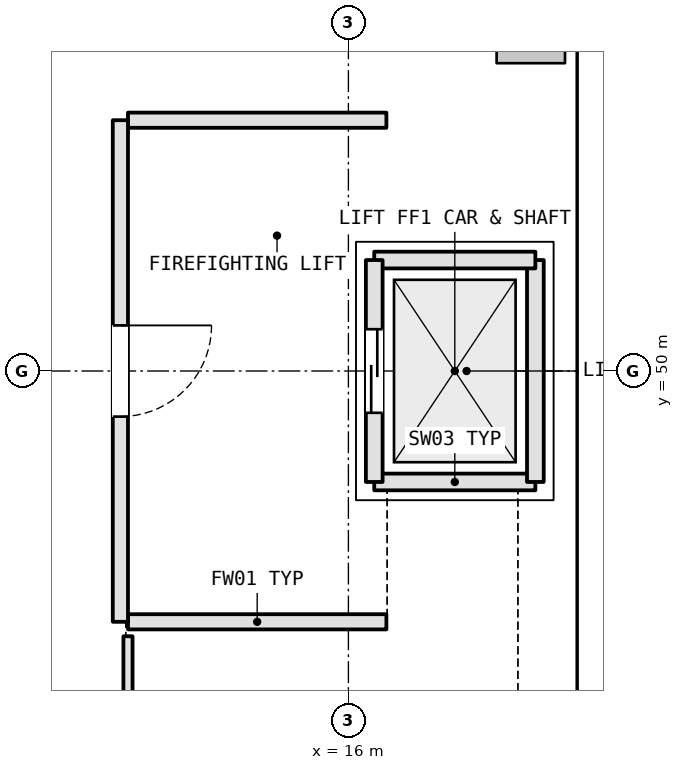
"""IFC4 building model, lengths in metres.
Left out: names, types, materials, properties, quantities, classifications, styles, units other than length and angle.
Written with IfcOpenShell. Run it as: python <this file> out.ifc"""

import sys

from ifc_helpers import new_model, si_unit, direction, frame, frame_2d, origin, origin_2d, place, context, subcontext, project, spatial, rectangle, extrude, element, fill, save


model = new_model("IFC4")
c1 = context("Model", 3, precision=1e-05, world=origin(), true_north=direction((0.0, 1.0)))
c2 = subcontext(c1, "Body", "Model", "MODEL_VIEW")
j1 = project(units=[si_unit("LENGTHUNIT", "METRE"), si_unit("PLANEANGLEUNIT", "RADIAN")], contexts=[c1])
p1 = place(None, origin())
s1 = spatial("IfcSite", under=j1, at=p1, CompositionType="ELEMENT")
p2 = place(p1, origin())
s2 = spatial("IfcBuilding", under=s1, at=p2, CompositionType="ELEMENT")
p3 = place(p2, origin())
s3 = spatial("IfcBuildingStorey", under=s2, at=p3, CompositionType="ELEMENT", Elevation=0.0)
p4 = place(p3, frame((18.4, 54.5, 0.0), z_axis=(0.0, 0.0, 1.0), x_axis=(1.0, 0.0, 0.0)))
e1 = element("IfcColumn", 1, at=p4, inside=s3, PredefinedType="COLUMN", context=c2, shape_type="SweptSolid", body=[
    extrude(rectangle(XDim=0.9, YDim=0.9, at=origin_2d()), origin(), (0.0, 0.0, 1.0), 5.4),
])
p5 = place(p3, frame((19.104, 70.476, 0.0), z_axis=(0.0, 0.0, 1.0), x_axis=(0.19509043962, -0.98078525701, 0.0)))
e2 = element("IfcWall", 2, at=p5, inside=s3, PredefinedType="SOLIDWALL", context=c2, shape_type="SweptSolid", body=[
    extrude(rectangle(XDim=19.135, YDim=0.34, at=frame_2d((9.568, 0.0))), origin(), (0.0, 0.0, 1.0), 4.385),
])
p6 = place(p5, frame((8.768, 0.0, 2.4)))
e3 = element("IfcOpeningElement", 3, at=p6, cuts=e2, PredefinedType="OPENING", context=c2, shape_type="SweptSolid", body=[
    extrude(rectangle(XDim=1.6, YDim=1.2, at=frame_2d((0.8, 0.6))), frame((0.0, 0.18, 0.0), z_axis=(0.0, -1.0, 0.0), x_axis=(1.0, 0.0, 0.0)), (0.0, 0.0, 1.0), 0.36),
])
p7 = place(p3, frame((16.34, 48.54, -1.1), z_axis=(0.0, 0.0, 1.0), x_axis=(1.0, 0.0, 0.0)))
e4 = element("IfcWall", 4, at=p7, inside=s3, PredefinedType="SHEAR", context=c2, shape_type="SweptSolid", body=[
    extrude(rectangle(XDim=2.12, YDim=0.22, at=frame_2d((1.06, 0.0))), origin(), (0.0, 0.0, 1.0), 6.24),
])
p8 = place(p3, frame((18.46, 48.54, -1.1), z_axis=(0.0, 0.0, 1.0), x_axis=(0.0, 1.0, 0.0)))
e5 = element("IfcWall", 5, at=p8, inside=s3, PredefinedType="SHEAR", context=c2, shape_type="SweptSolid", body=[
    extrude(rectangle(XDim=2.92, YDim=0.22, at=frame_2d((1.46, 0.0))), origin(), (0.0, 0.0, 1.0), 6.24),
])
p9 = place(p3, frame((18.46, 51.46, -1.1), z_axis=(0.0, 0.0, 1.0), x_axis=(-1.0, 0.0, 0.0)))
e6 = element("IfcWall", 6, at=p9, inside=s3, PredefinedType="SHEAR", context=c2, shape_type="SweptSolid", body=[
    extrude(rectangle(XDim=2.12, YDim=0.22, at=frame_2d((1.06, 0.0))), origin(), (0.0, 0.0, 1.0), 6.24),
])
p10 = place(p3, frame((16.34, 51.46, -1.1), z_axis=(0.0, 0.0, 1.0), x_axis=(0.0, -1.0, 0.0)))
e7 = element("IfcWall", 7, at=p10, inside=s3, PredefinedType="SHEAR", context=c2, shape_type="SweptSolid", body=[
    extrude(rectangle(XDim=2.92, YDim=0.22, at=frame_2d((1.46, 0.0))), origin(), (0.0, 0.0, 1.0), 6.24),
])
p11 = place(p10, frame((0.91, 0.0, 1.1)))
e8 = element("IfcOpeningElement", 8, at=p11, cuts=e7, PredefinedType="OPENING", context=c2, shape_type="SweptSolid", body=[
    extrude(rectangle(XDim=1.1, YDim=2.2, at=frame_2d((0.55, 1.1))), frame((0.0, 0.12, 0.0), z_axis=(0.0, -1.0, 0.0), x_axis=(1.0, 0.0, 0.0)), (0.0, 0.0, 1.0), 0.24),
])
for number, where, z_axis, x_axis in (
    (9, (13.1, 46.7, 0.0), (0.0, 0.0, 1.0), (1.0, 0.0, 0.0)),
    (10, (16.5, 53.3, 0.0), (0.0, 0.0, 1.0), (-1.0, 0.0, 0.0)),
):
    element("IfcWall", number, at=place(p3, frame(where, z_axis=z_axis, x_axis=x_axis)), inside=s3, PredefinedType="SOLIDWALL", context=c2, shape_type="SweptSolid", body=[
        extrude(rectangle(XDim=3.4, YDim=0.2, at=frame_2d((1.7, 0.0))), origin(), (0.0, 0.0, 1.0), 5.12),
    ])
p12 = place(p3, frame((13.0, 53.3, 0.0), z_axis=(0.0, 0.0, 1.0), x_axis=(0.0, -1.0, 0.0)))
e11 = element("IfcWall", 11, at=p12, inside=s3, PredefinedType="SOLIDWALL", context=c2, shape_type="SweptSolid", body=[
    extrude(rectangle(XDim=6.6, YDim=0.2, at=frame_2d((3.3, 0.0))), origin(), (0.0, 0.0, 1.0), 5.12),
])
p13 = place(p12, frame((2.7, 0.0, 0.0)))
e12 = element("IfcOpeningElement", 12, at=p13, cuts=e11, PredefinedType="OPENING", context=c2, shape_type="SweptSolid", body=[
    extrude(rectangle(XDim=1.2, YDim=2.2, at=frame_2d((0.6, 1.1))), frame((0.0, 0.11, 0.0), z_axis=(0.0, -1.0, 0.0), x_axis=(1.0, 0.0, 0.0)), (0.0, 0.0, 1.0), 0.22),
])
p14 = place(p3, frame((13.1, 41.854, 0.0), z_axis=(0.0, 0.0, 1.0), x_axis=(0.0, 1.0, 0.0)))
e13 = element("IfcWall", 13, at=p14, inside=s3, PredefinedType="PARTITIONING", context=c2, shape_type="SweptSolid", body=[
    extrude(rectangle(XDim=4.656, YDim=0.12, at=frame_2d((2.328, 0.0))), origin(), (0.0, 0.0, 1.0), 4.668),
])
p15 = place(p14, frame((1.553, 0.0, 0.0)))
e14 = element("IfcOpeningElement", 14, at=p15, cuts=e13, PredefinedType="OPENING", context=c2, shape_type="SweptSolid", body=[
    extrude(rectangle(XDim=1.55, YDim=2.15, at=frame_2d((0.775, 1.075))), frame((0.0, 0.07, 0.0), z_axis=(0.0, -1.0, 0.0), x_axis=(1.0, 0.0, 0.0)), (0.0, 0.0, 1.0), 0.14),
])
p16 = place(p11, origin())
e15 = element("IfcDoor", 15, at=p16, inside=s3, OperationType="DOUBLE_DOOR_SLIDING", PredefinedType="DOOR", context=c2, shape_type="SweptSolid", body=[
    extrude(rectangle(XDim=1.1, YDim=2.2, at=frame_2d((0.55, 1.1))), frame((0.0, 0.025, 0.0), z_axis=(0.0, -1.0, 0.0), x_axis=(1.0, 0.0, 0.0)), (0.0, 0.0, 1.0), 0.05),
])
fill(e8, e15)
p17 = place(p13, origin())
e16 = element("IfcDoor", 16, at=p17, inside=s3, OperationType="SINGLE_SWING_LEFT", PredefinedType="DOOR", context=c2, shape_type="SweptSolid", body=[
    extrude(rectangle(XDim=1.2, YDim=2.2, at=frame_2d((0.6, 1.1))), frame((0.0, 0.025, 0.0), z_axis=(0.0, -1.0, 0.0), x_axis=(1.0, 0.0, 0.0)), (0.0, 0.0, 1.0), 0.05),
])
fill(e12, e16)
save(model, sys.argv[1])
